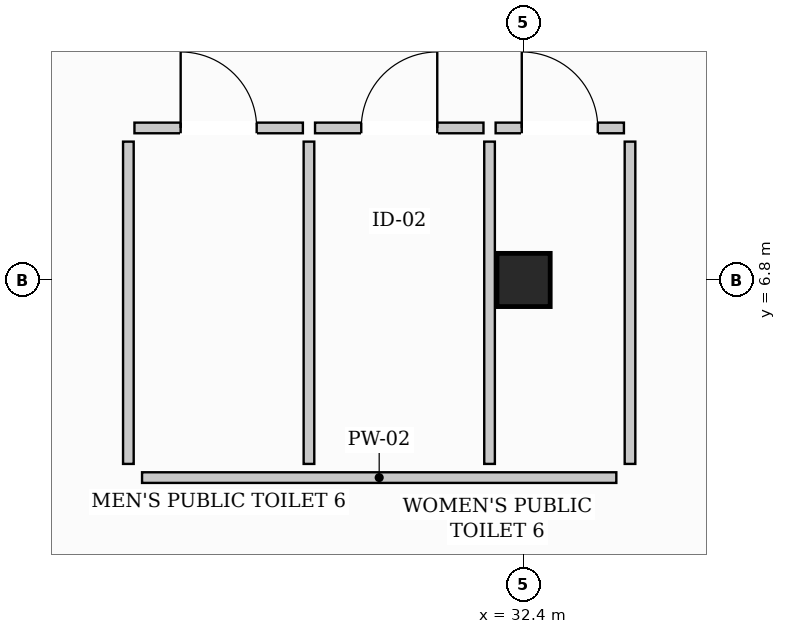
"""IFC4 building model, lengths in metres.
Left out: names, types, materials, properties, quantities, classifications, styles, units other than length and angle.
Written with IfcOpenShell. Run it as: python <this file> out.ifc"""

import sys

from ifc_helpers import new_model, si_unit, direction, frame, frame_2d, origin, origin_2d, place, context, subcontext, project, spatial, rectangle, extrude, element, fill, save


model = new_model("IFC4")
c1 = context("Model", 3, precision=1e-05, world=origin(), true_north=direction((0.0, 1.0)))
c2 = subcontext(c1, "Body", "Model", "MODEL_VIEW")
j1 = project(units=[si_unit("LENGTHUNIT", "METRE"), si_unit("PLANEANGLEUNIT", "RADIAN")], contexts=[c1])
p1 = place(None, origin())
s1 = spatial("IfcSite", under=j1, at=p1, CompositionType="ELEMENT")
p2 = place(p1, origin())
s2 = spatial("IfcBuilding", under=s1, at=p2, CompositionType="ELEMENT")
p3 = place(p2, frame((0.0, 0.0, 5.1)))
s3 = spatial("IfcBuildingStorey", under=s2, at=p3, CompositionType="ELEMENT", Elevation=5.1)
p4 = place(p3, frame((32.4, 6.8, 0.0), z_axis=(0.0, 0.0, 1.0), x_axis=(1.0, 0.0, 0.0)))
e1 = element("IfcColumn", 1, at=p4, inside=s3, PredefinedType="COLUMN", context=c2, shape_type="SweptSolid", body=[
    extrude(rectangle(XDim=0.7, YDim=0.7, at=origin_2d()), origin(), (0.0, 0.0, 1.0), 4.5),
])
p5 = place(p3, frame((27.38, 4.2, 0.0), z_axis=(0.0, 0.0, 1.0), x_axis=(1.0, 0.0, 0.0)))
e2 = element("IfcWall", 2, at=p5, inside=s3, PredefinedType="PARTITIONING", context=c2, shape_type="SweptSolid", body=[
    extrude(rectangle(XDim=6.24, YDim=0.14, at=frame_2d((3.12, 0.0))), origin(), (0.0, 0.0, 1.0), 3.89),
])
p6 = place(p3, frame((27.2, 4.38, 0.0), z_axis=(0.0, 0.0, 1.0), x_axis=(0.0, 1.0, 0.0)))
e3 = element("IfcWall", 3, at=p6, inside=s3, PredefinedType="PARTITIONING", context=c2, shape_type="SweptSolid", body=[
    extrude(rectangle(XDim=4.24, YDim=0.14, at=frame_2d((2.12, 0.0))), origin(), (0.0, 0.0, 1.0), 3.87),
])
p7 = place(p3, frame((33.8, 4.38, 0.0), z_axis=(0.0, 0.0, 1.0), x_axis=(0.0, 1.0, 0.0)))
e4 = element("IfcWall", 4, at=p7, inside=s3, PredefinedType="PARTITIONING", context=c2, shape_type="SweptSolid", body=[
    extrude(rectangle(XDim=4.24, YDim=0.14, at=frame_2d((2.12, 0.0))), origin(), (0.0, 0.0, 1.0), 3.62),
])
for number, where, z_axis, x_axis in (
    (5, (29.576, 4.38, 0.0), (0.0, 0.0, 1.0), (0.0, 1.0, 0.0)),
    (6, (31.952, 4.38, 0.0), (0.0, 0.0, 1.0), (0.0, 1.0, 0.0)),
):
    element("IfcWall", number, at=place(p3, frame(where, z_axis=z_axis, x_axis=x_axis)), inside=s3, PredefinedType="PARTITIONING", context=c2, shape_type="SweptSolid", body=[
        extrude(rectangle(XDim=4.24, YDim=0.14, at=frame_2d((2.12, 0.0))), origin(), (0.0, 0.0, 1.0), 3.87),
    ])
p8 = place(p3, frame((27.28, 8.8, 0.0), z_axis=(0.0, 0.0, 1.0), x_axis=(1.0, 0.0, 0.0)))
e7 = element("IfcWall", 7, at=p8, inside=s3, PredefinedType="PARTITIONING", context=c2, shape_type="SweptSolid", body=[
    extrude(rectangle(XDim=2.216, YDim=0.14, at=frame_2d((1.108, 0.0))), origin(), (0.0, 0.0, 1.0), 4.0),
])
p9 = place(p8, frame((0.608, 0.0, 0.0)))
e8 = element("IfcOpeningElement", 8, at=p9, cuts=e7, PredefinedType="OPENING", context=c2, shape_type="SweptSolid", body=[
    extrude(rectangle(XDim=1.0, YDim=2.15, at=frame_2d((0.5, 1.075))), frame((0.0, 0.08, 0.0), z_axis=(0.0, -1.0, 0.0), x_axis=(1.0, 0.0, 0.0)), (0.0, 0.0, 1.0), 0.16),
])
p10 = place(p3, frame((29.656, 8.8, 0.0), z_axis=(0.0, 0.0, 1.0), x_axis=(1.0, 0.0, 0.0)))
e9 = element("IfcWall", 9, at=p10, inside=s3, PredefinedType="PARTITIONING", context=c2, shape_type="SweptSolid", body=[
    extrude(rectangle(XDim=2.216, YDim=0.14, at=frame_2d((1.108, 0.0))), origin(), (0.0, 0.0, 1.0), 4.22),
])
p11 = place(p10, frame((0.608, 0.0, 0.0)))
e10 = element("IfcOpeningElement", 10, at=p11, cuts=e9, PredefinedType="OPENING", context=c2, shape_type="SweptSolid", body=[
    extrude(rectangle(XDim=1.0, YDim=2.15, at=frame_2d((0.5, 1.075))), frame((0.0, 0.08, 0.0), z_axis=(0.0, -1.0, 0.0), x_axis=(1.0, 0.0, 0.0)), (0.0, 0.0, 1.0), 0.16),
])
p12 = place(p3, frame((32.032, 8.8, 0.0), z_axis=(0.0, 0.0, 1.0), x_axis=(1.0, 0.0, 0.0)))
e11 = element("IfcWall", 11, at=p12, inside=s3, PredefinedType="PARTITIONING", context=c2, shape_type="SweptSolid", body=[
    extrude(rectangle(XDim=1.688, YDim=0.14, at=frame_2d((0.844, 0.0))), origin(), (0.0, 0.0, 1.0), 3.47),
])
p13 = place(p12, frame((0.344, 0.0, 0.0)))
e12 = element("IfcOpeningElement", 12, at=p13, cuts=e11, PredefinedType="OPENING", context=c2, shape_type="SweptSolid", body=[
    extrude(rectangle(XDim=1.0, YDim=2.15, at=frame_2d((0.5, 1.075))), frame((0.0, 0.08, 0.0), z_axis=(0.0, -1.0, 0.0), x_axis=(1.0, 0.0, 0.0)), (0.0, 0.0, 1.0), 0.16),
])
p14 = place(p9, origin())
e13 = element("IfcDoor", 13, at=p14, inside=s3, OperationType="SINGLE_SWING_LEFT", PredefinedType="DOOR", context=c2, shape_type="SweptSolid", body=[
    extrude(rectangle(XDim=1.0, YDim=2.15, at=frame_2d((0.5, 1.075))), frame((0.0, 0.025, 0.0), z_axis=(0.0, -1.0, 0.0), x_axis=(1.0, 0.0, 0.0)), (0.0, 0.0, 1.0), 0.05),
])
fill(e8, e13)
p15 = place(p11, origin())
e14 = element("IfcDoor", 14, at=p15, inside=s3, OperationType="SINGLE_SWING_RIGHT", PredefinedType="DOOR", context=c2, shape_type="SweptSolid", body=[
    extrude(rectangle(XDim=1.0, YDim=2.15, at=frame_2d((0.5, 1.075))), frame((0.0, 0.025, 0.0), z_axis=(0.0, -1.0, 0.0), x_axis=(1.0, 0.0, 0.0)), (0.0, 0.0, 1.0), 0.05),
])
fill(e10, e14)
p16 = place(p13, origin())
e15 = element("IfcDoor", 15, at=p16, inside=s3, OperationType="SINGLE_SWING_LEFT", PredefinedType="DOOR", context=c2, shape_type="SweptSolid", body=[
    extrude(rectangle(XDim=1.0, YDim=2.15, at=frame_2d((0.5, 1.075))), frame((0.0, 0.025, 0.0), z_axis=(0.0, -1.0, 0.0), x_axis=(1.0, 0.0, 0.0)), (0.0, 0.0, 1.0), 0.05),
])
fill(e12, e15)
save(model, sys.argv[1])
